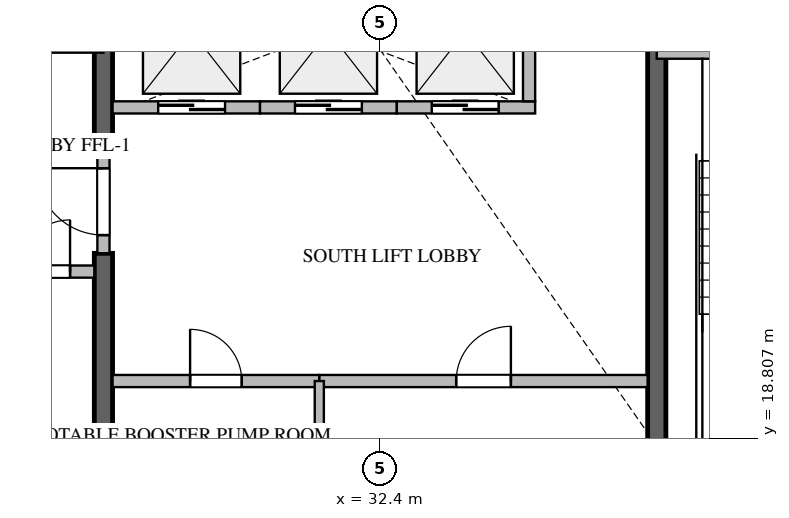
"""IFC4 building model, lengths in metres.
Left out: names, types, materials, properties, quantities, classifications, styles, units other than length and angle.
Written with IfcOpenShell. Run it as: python <this file> out.ifc"""

import sys

from ifc_helpers import new_model, si_unit, direction, frame, frame_2d, origin, place, context, subcontext, project, spatial, rectangle, extrude, source, transform, mapped, element, fill, save


model = new_model("IFC4")
c1 = context("Model", 3, precision=1e-05, world=origin(), true_north=direction((0.0, 1.0)))
c2 = subcontext(c1, "Body", "Model", "MODEL_VIEW")
j1 = project(units=[si_unit("LENGTHUNIT", "METRE"), si_unit("PLANEANGLEUNIT", "RADIAN")], contexts=[c1])
p1 = place(None, origin())
s1 = spatial("IfcSite", under=j1, at=p1, CompositionType="ELEMENT")
p2 = place(p1, origin())
s2 = spatial("IfcBuilding", under=s1, at=p2, CompositionType="ELEMENT")
p3 = place(p2, frame((0.0, 0.0, 180.15)))
s3 = spatial("IfcBuildingStorey", under=s2, at=p3, CompositionType="ELEMENT", Elevation=180.15)
p4 = place(p3, frame((27.85, 17.0, -0.26), z_axis=(0.0, 0.0, 1.0), x_axis=(0.0, 1.0, 0.0)))
e1 = element("IfcWall", 1, at=p4, inside=s3, PredefinedType="SHEAR", context=c2, shape_type="SweptSolid", body=[
    extrude(rectangle(XDim=4.85, YDim=0.3, at=frame_2d((2.425, 0.0))), origin(), (0.0, 0.0, 1.0), 3.748),
])
p5 = place(p3, frame((27.85, 23.55, -0.26), z_axis=(0.0, 0.0, 1.0), x_axis=(0.0, 1.0, 0.0)))
e2 = element("IfcWall", 2, at=p5, inside=s3, PredefinedType="SHEAR", context=c2, shape_type="SweptSolid", body=[
    extrude(rectangle(XDim=9.85, YDim=0.3, at=frame_2d((4.925, 0.0))), origin(), (0.0, 0.0, 1.0), 3.748),
])
p6 = place(p3, frame((36.95, 17.0, -0.26), z_axis=(0.0, 0.0, 1.0), x_axis=(0.0, 1.0, 0.0)))
e3 = element("IfcWall", 3, at=p6, inside=s3, PredefinedType="SHEAR", context=c2, shape_type="SweptSolid", body=[
    extrude(rectangle(XDim=8.35, YDim=0.3, at=frame_2d((4.175, 0.0))), origin(), (0.0, 0.0, 1.0), 3.748),
])
p7 = place(p3, frame((36.95, 25.15, 0.0), z_axis=(0.0, 0.0, 1.0), x_axis=(1.0, 0.0, 0.0)))
e4 = element("IfcWall", 4, at=p7, inside=s3, PredefinedType="STANDARD", context=c2, shape_type="SweptSolid", body=[
    extrude(rectangle(XDim=4.45, YDim=0.2, at=frame_2d((2.225, 0.0))), origin(), (0.0, 0.0, 1.0), 3.49),
])
p8 = place(p7, frame((1.65, 0.0, 0.0)))
e5 = element("IfcOpeningElement", 5, at=p8, cuts=e4, PredefinedType="OPENING", context=c2, shape_type="SweptSolid", body=[
    extrude(rectangle(XDim=1.1, YDim=2.15, at=frame_2d((0.55, 1.075))), frame((0.0, 0.11, 0.0), z_axis=(0.0, -1.0, 0.0), x_axis=(1.0, 0.0, 0.0)), (0.0, 0.0, 1.0), 0.22),
])
p9 = place(p3, frame((28.0, 24.25, 0.0), z_axis=(0.0, 0.0, 1.0), x_axis=(1.0, 0.0, 0.0)))
e6 = element("IfcWall", 6, at=p9, inside=s3, PredefinedType="STANDARD", context=c2, shape_type="SweptSolid", body=[
    extrude(rectangle(XDim=2.425, YDim=0.2, at=frame_2d((1.212, 0.0))), origin(), (0.0, 0.0, 1.0), 3.49),
])
p10 = place(p9, frame((0.75, 0.0, 0.0)))
e7 = element("IfcOpeningElement", 7, at=p10, cuts=e6, PredefinedType="OPENING", context=c2, shape_type="SweptSolid", body=[
    extrude(rectangle(XDim=1.1, YDim=2.2, at=frame_2d((0.55, 1.1))), frame((0.0, 0.11, 0.0), z_axis=(0.0, -1.0, 0.0), x_axis=(1.0, 0.0, 0.0)), (0.0, 0.0, 1.0), 0.22),
])
p11 = place(p3, frame((30.425, 24.25, 0.0), z_axis=(0.0, 0.0, 1.0), x_axis=(1.0, 0.0, 0.0)))
e8 = element("IfcWall", 8, at=p11, inside=s3, PredefinedType="STANDARD", context=c2, shape_type="SweptSolid", body=[
    extrude(rectangle(XDim=2.25, YDim=0.2, at=frame_2d((1.125, 0.0))), origin(), (0.0, 0.0, 1.0), 3.49),
])
p12 = place(p11, frame((0.575, 0.0, 0.0)))
e9 = element("IfcOpeningElement", 9, at=p12, cuts=e8, PredefinedType="OPENING", context=c2, shape_type="SweptSolid", body=[
    extrude(rectangle(XDim=1.1, YDim=2.2, at=frame_2d((0.55, 1.1))), frame((0.0, 0.11, 0.0), z_axis=(0.0, -1.0, 0.0), x_axis=(1.0, 0.0, 0.0)), (0.0, 0.0, 1.0), 0.22),
])
p13 = place(p3, frame((32.675, 24.25, 0.0), z_axis=(0.0, 0.0, 1.0), x_axis=(1.0, 0.0, 0.0)))
e10 = element("IfcWall", 10, at=p13, inside=s3, PredefinedType="STANDARD", context=c2, shape_type="SweptSolid", body=[
    extrude(rectangle(XDim=2.275, YDim=0.2, at=frame_2d((1.137, 0.0))), origin(), (0.0, 0.0, 1.0), 3.49),
])
p14 = place(p13, frame((0.575, 0.0, 0.0)))
e11 = element("IfcOpeningElement", 11, at=p14, cuts=e10, PredefinedType="OPENING", context=c2, shape_type="SweptSolid", body=[
    extrude(rectangle(XDim=1.1, YDim=2.2, at=frame_2d((0.55, 1.1))), frame((0.0, 0.11, 0.0), z_axis=(0.0, -1.0, 0.0), x_axis=(1.0, 0.0, 0.0)), (0.0, 0.0, 1.0), 0.22),
])
p15 = place(p3, frame((34.85, 24.35, 0.0), z_axis=(0.0, 0.0, 1.0), x_axis=(0.0, 1.0, 0.0)))
e12 = element("IfcWall", 12, at=p15, inside=s3, PredefinedType="STANDARD", context=c2, shape_type="SweptSolid", body=[
    extrude(rectangle(XDim=2.5, YDim=0.2, at=frame_2d((1.25, 0.0))), origin(), (0.0, 0.0, 1.0), 3.49),
])
p16 = place(p3, frame((26.052, 21.55, 0.0), z_axis=(0.0, 0.0, 1.0), x_axis=(1.0, 0.0, 0.0)))
e13 = element("IfcWall", 13, at=p16, inside=s3, PredefinedType="STANDARD", context=c2, shape_type="SweptSolid", body=[
    extrude(rectangle(XDim=1.648, YDim=0.2, at=frame_2d((0.824, 0.0))), origin(), (0.0, 0.0, 1.0), 3.49),
])
p17 = place(p16, frame((0.399, 0.0, 0.0)))
e14 = element("IfcOpeningElement", 14, at=p17, cuts=e13, PredefinedType="OPENING", context=c2, shape_type="SweptSolid", body=[
    extrude(rectangle(XDim=0.85, YDim=2.1, at=frame_2d((0.425, 1.05))), frame((0.0, 0.11, 0.0), z_axis=(0.0, -1.0, 0.0), x_axis=(1.0, 0.0, 0.0)), (0.0, 0.0, 1.0), 0.22),
])
p18 = place(p3, frame((27.85, 21.852, 0.0), z_axis=(0.0, 0.0, 1.0), x_axis=(0.0, 1.0, 0.0)))
e15 = element("IfcWall", 15, at=p18, inside=s3, PredefinedType="STANDARD", context=c2, shape_type="SweptSolid", body=[
    extrude(rectangle(XDim=1.696, YDim=0.2, at=frame_2d((0.848, 0.0))), origin(), (0.0, 0.0, 1.0), 3.49),
])
p19 = place(p18, frame((0.298, 0.0, 0.0)))
e16 = element("IfcOpeningElement", 16, at=p19, cuts=e15, PredefinedType="OPENING", context=c2, shape_type="SweptSolid", body=[
    extrude(rectangle(XDim=1.1, YDim=2.15, at=frame_2d((0.55, 1.075))), frame((0.0, 0.11, 0.0), z_axis=(0.0, -1.0, 0.0), x_axis=(1.0, 0.0, 0.0)), (0.0, 0.0, 1.0), 0.22),
])
p20 = place(p3, frame((28.0, 19.75, 0.0), z_axis=(0.0, 0.0, 1.0), x_axis=(1.0, 0.0, 0.0)))
e17 = element("IfcWall", 17, at=p20, inside=s3, PredefinedType="STANDARD", context=c2, shape_type="SweptSolid", body=[
    extrude(rectangle(XDim=3.4, YDim=0.2, at=frame_2d((1.7, 0.0))), origin(), (0.0, 0.0, 1.0), 3.49),
])
p21 = place(p20, frame((1.275, 0.0, 0.0)))
e18 = element("IfcOpeningElement", 18, at=p21, cuts=e17, PredefinedType="OPENING", context=c2, shape_type="SweptSolid", body=[
    extrude(rectangle(XDim=0.85, YDim=2.1, at=frame_2d((0.425, 1.05))), frame((0.0, 0.11, 0.0), z_axis=(0.0, -1.0, 0.0), x_axis=(1.0, 0.0, 0.0)), (0.0, 0.0, 1.0), 0.22),
])
p22 = place(p3, frame((31.402, 19.75, 0.0), z_axis=(0.0, 0.0, 1.0), x_axis=(1.0, 0.0, 0.0)))
e19 = element("IfcWall", 19, at=p22, inside=s3, PredefinedType="STANDARD", context=c2, shape_type="SweptSolid", body=[
    extrude(rectangle(XDim=5.398, YDim=0.2, at=frame_2d((2.699, 0.0))), origin(), (0.0, 0.0, 1.0), 3.49),
])
p23 = place(p22, frame((2.249, 0.0, 0.0)))
e20 = element("IfcOpeningElement", 20, at=p23, cuts=e19, PredefinedType="OPENING", context=c2, shape_type="SweptSolid", body=[
    extrude(rectangle(XDim=0.9, YDim=2.1, at=frame_2d((0.45, 1.05))), frame((0.0, 0.11, 0.0), z_axis=(0.0, -1.0, 0.0), x_axis=(1.0, 0.0, 0.0)), (0.0, 0.0, 1.0), 0.22),
])
p24 = place(p3, frame((31.4, 17.02, 0.0), z_axis=(0.0, 0.0, 1.0), x_axis=(0.0, 1.0, 0.0)))
e21 = element("IfcWall", 21, at=p24, inside=s3, PredefinedType="PARTITIONING", context=c2, shape_type="SweptSolid", body=[
    extrude(rectangle(XDim=2.73, YDim=0.15, at=frame_2d((1.365, 0.0))), origin(), (0.0, 0.0, 1.0), 3.49),
])
m1 = source(origin(), c2, "Body", "SweptSolid", [
    extrude(rectangle(XDim=1.1, YDim=2.2, at=frame_2d((0.55, 1.1))), frame((0.0, 0.025, 0.0), z_axis=(0.0, -1.0, 0.0), x_axis=(1.0, 0.0, 0.0)), (0.0, 0.0, 1.0), 0.05),
])
p25 = place(p10, origin())
e22 = element("IfcDoor", 22, at=p25, inside=s3, OperationType="DOUBLE_DOOR_SLIDING", PredefinedType="DOOR", context=c2, shape_type="MappedRepresentation", body=[
    mapped(m1, transform((0.0, 0.0, 0.0), scale=1.0)),
])
fill(e7, e22)
p26 = place(p12, origin())
e23 = element("IfcDoor", 23, at=p26, inside=s3, OperationType="DOUBLE_DOOR_SLIDING", PredefinedType="DOOR", context=c2, shape_type="MappedRepresentation", body=[
    mapped(m1, transform((0.0, 0.0, 0.0), scale=1.0)),
])
fill(e9, e23)
p27 = place(p14, origin())
e24 = element("IfcDoor", 24, at=p27, inside=s3, OperationType="DOUBLE_DOOR_SLIDING", PredefinedType="DOOR", context=c2, shape_type="MappedRepresentation", body=[
    mapped(m1, transform((0.0, 0.0, 0.0), scale=1.0)),
])
fill(e11, e24)
m2 = source(origin(), c2, "Body", "SweptSolid", [
    extrude(rectangle(XDim=0.85, YDim=2.1, at=frame_2d((0.425, 1.05))), frame((0.0, 0.025, 0.0), z_axis=(0.0, -1.0, 0.0), x_axis=(1.0, 0.0, 0.0)), (0.0, 0.0, 1.0), 0.05),
])
p28 = place(p17, origin())
e25 = element("IfcDoor", 25, at=p28, inside=s3, OperationType="SINGLE_SWING_RIGHT", PredefinedType="DOOR", context=c2, shape_type="MappedRepresentation", body=[
    mapped(m2, transform((0.0, 0.0, 0.0), scale=1.0)),
])
fill(e14, e25)
m3 = source(origin(), c2, "Body", "SweptSolid", [
    extrude(rectangle(XDim=1.1, YDim=2.15, at=frame_2d((0.55, 1.075))), frame((0.0, 0.025, 0.0), z_axis=(0.0, -1.0, 0.0), x_axis=(1.0, 0.0, 0.0)), (0.0, 0.0, 1.0), 0.05),
])
p29 = place(p19, origin())
e26 = element("IfcDoor", 26, at=p29, inside=s3, OperationType="SINGLE_SWING_RIGHT", PredefinedType="DOOR", context=c2, shape_type="MappedRepresentation", body=[
    mapped(m3, transform((0.0, 0.0, 0.0), scale=1.0)),
])
fill(e16, e26)
p30 = place(p21, origin())
e27 = element("IfcDoor", 27, at=p30, inside=s3, OperationType="SINGLE_SWING_LEFT", PredefinedType="DOOR", context=c2, shape_type="MappedRepresentation", body=[
    mapped(m2, transform((0.0, 0.0, 0.0), scale=1.0)),
])
fill(e18, e27)
m4 = source(origin(), c2, "Body", "SweptSolid", [
    extrude(rectangle(XDim=0.9, YDim=2.1, at=frame_2d((0.45, 1.05))), frame((0.0, 0.025, 0.0), z_axis=(0.0, -1.0, 0.0), x_axis=(1.0, 0.0, 0.0)), (0.0, 0.0, 1.0), 0.05),
])
p31 = place(p23, origin())
e28 = element("IfcDoor", 28, at=p31, inside=s3, OperationType="SINGLE_SWING_RIGHT", PredefinedType="DOOR", context=c2, shape_type="MappedRepresentation", body=[
    mapped(m4, transform((0.0, 0.0, 0.0), scale=1.0)),
])
fill(e20, e28)
save(model, sys.argv[1])
